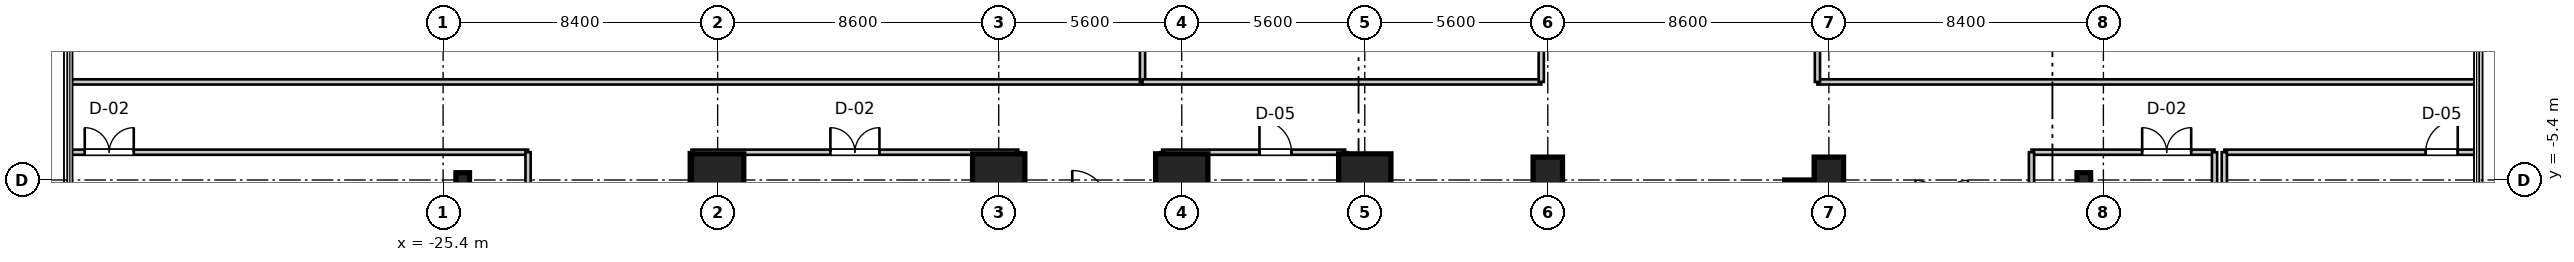
"""IFC4 building model, lengths in metres.
Left out: names, types, materials, properties, quantities, classifications, styles, units other than length and angle.
Written with IfcOpenShell. Run it as: python <this file> out.ifc"""

import sys

from ifc_helpers import new_model, si_unit, direction, frame, frame_2d, origin, origin_2d, place, context, subcontext, project, spatial, rectangle, i_section, extrude, source, transform, mapped, element, fill, save


model = new_model("IFC4")
c1 = context("Model", 3, precision=1e-05, world=origin(), true_north=direction((0.0, 1.0)))
c2 = subcontext(c1, "Body", "Model", "MODEL_VIEW")
j1 = project(units=[si_unit("LENGTHUNIT", "METRE"), si_unit("PLANEANGLEUNIT", "RADIAN")], contexts=[c1])
p1 = place(None, origin())
s1 = spatial("IfcSite", under=j1, at=p1, CompositionType="ELEMENT")
p2 = place(p1, origin())
s2 = spatial("IfcBuilding", under=s1, at=p2, CompositionType="ELEMENT")
p3 = place(p2, frame((0.0, 0.0, 10.8)))
s3 = spatial("IfcBuildingStorey", under=s2, at=p3, CompositionType="ELEMENT", Elevation=10.8)
m1 = source(origin(), c2, "Body", "SweptSolid", [
    extrude(rectangle(XDim=1.6, YDim=1.6, at=origin_2d()), origin(), (0.0, 0.0, 1.0), 5.355),
])
for number, where, z_axis, x_axis in (
    (1, (-17.0, -5.4, 0.0), (0.0, 0.0, 1.0), (1.0, 0.0, 0.0)),
    (2, (-8.4, -5.4, 0.0), (0.0, 0.0, 1.0), (1.0, 0.0, 0.0)),
    (3, (-2.8, -5.4, 0.0), (0.0, 0.0, 1.0), (1.0, 0.0, 0.0)),
    (4, (2.8, -5.4, 0.0), (0.0, 0.0, 1.0), (1.0, 0.0, 0.0)),
):
    element("IfcColumn", number, at=place(p3, frame(where, z_axis=z_axis, x_axis=x_axis)), inside=s3, PredefinedType="COLUMN", context=c2, shape_type="MappedRepresentation", body=[
        mapped(m1, transform((0.0, 0.0, 0.0), scale=1.0)),
    ])
m2 = source(origin(), c2, "Body", "SweptSolid", [
    extrude(rectangle(XDim=0.9, YDim=1.4, at=origin_2d()), origin(), (0.0, 0.0, 1.0), 5.355),
])
for number, where, z_axis, x_axis in (
    (5, (8.4, -5.4, 0.0), (0.0, 0.0, 1.0), (1.0, 0.0, 0.0)),
    (6, (17.0, -5.4, 0.0), (0.0, 0.0, 1.0), (1.0, 0.0, 0.0)),
):
    element("IfcColumn", number, at=place(p3, frame(where, z_axis=z_axis, x_axis=x_axis)), inside=s3, PredefinedType="PILASTER", context=c2, shape_type="MappedRepresentation", body=[
        mapped(m2, transform((0.0, 0.0, 0.0), scale=1.0)),
    ])
m3 = source(origin(), c2, "Body", "SweptSolid", [
    extrude(i_section(OverallWidth=0.416, OverallDepth=0.446, WebThickness=0.025, FlangeThickness=0.04, at=origin_2d()), origin(), (0.0, 0.0, 1.0), 5.355),
])
for number, where, z_axis, x_axis in (
    (7, (-24.8, -5.4, 0.0), (0.0, 0.0, 1.0), (1.0, 0.0, 0.0)),
    (8, (24.8, -5.4, 0.0), (0.0, 0.0, 1.0), (1.0, 0.0, 0.0)),
):
    element("IfcColumn", number, at=place(p3, frame(where, z_axis=z_axis, x_axis=x_axis)), inside=s3, PredefinedType="COLUMN", context=c2, shape_type="MappedRepresentation", body=[
        mapped(m3, transform((0.0, 0.0, 0.0), scale=1.0)),
    ])
m4 = source(origin(), c2, "Body", "SweptSolid", [
    extrude(rectangle(XDim=11.6, YDim=0.8, at=frame_2d((5.8, 0.0))), origin(), (0.0, 0.0, 1.0), 5.06),
])
p4 = place(p3, frame((16.05, -17.0, 0.0), z_axis=(0.0, 0.0, 1.0), x_axis=(0.0, 1.0, 0.0)))
e9 = element("IfcWall", 9, at=p4, inside=s3, PredefinedType="SHEAR", context=c2, shape_type="MappedRepresentation", body=[
    mapped(m4, transform((0.0, 0.0, 0.0), scale=1.0)),
])
m5 = source(origin(), c2, "Body", "SweptSolid", [
    extrude(rectangle(XDim=13.96, YDim=0.16, at=frame_2d((6.98, 0.0))), origin(), (0.0, 0.0, 1.0), 3.4),
])
p5 = place(p3, frame((-36.76, -4.55, 0.0), z_axis=(0.0, 0.0, 1.0), x_axis=(1.0, 0.0, 0.0)))
e10 = element("IfcWall", 10, at=p5, inside=s3, PredefinedType="PARTITIONING", context=c2, shape_type="MappedRepresentation", body=[
    mapped(m5, transform((0.0, 0.0, 0.0), scale=1.0)),
])
p6 = place(p5, frame((0.395, 0.0, 0.0)))
e11 = element("IfcOpeningElement", 11, at=p6, cuts=e10, PredefinedType="OPENING", context=c2, shape_type="SweptSolid", body=[
    extrude(rectangle(XDim=1.5, YDim=2.15, at=frame_2d((0.75, 1.075))), frame((0.0, 0.09, 0.0), z_axis=(0.0, -1.0, 0.0), x_axis=(1.0, 0.0, 0.0)), (0.0, 0.0, 1.0), 0.18),
])
m6 = source(origin(), c2, "Body", "SweptSolid", [
    extrude(rectangle(XDim=19.21, YDim=0.16, at=frame_2d((9.605, 0.0))), origin(), (0.0, 0.0, 1.0), 3.4),
])
p7 = place(p3, frame((-22.8, -23.76, 0.0), z_axis=(0.0, 0.0, 1.0), x_axis=(0.0, 1.0, 0.0)))
e12 = element("IfcWall", 12, at=p7, inside=s3, PredefinedType="PARTITIONING", context=c2, shape_type="MappedRepresentation", body=[
    mapped(m6, transform((0.0, 0.0, 0.0), scale=1.0)),
])
m7 = source(origin(), c2, "Body", "SweptSolid", [
    extrude(rectangle(XDim=10.0, YDim=0.16, at=frame_2d((5.0, 0.0))), origin(), (0.0, 0.0, 1.0), 3.4),
])
p8 = place(p3, frame((-17.8, -4.55, 0.0), z_axis=(0.0, 0.0, 1.0), x_axis=(1.0, 0.0, 0.0)))
e13 = element("IfcWall", 13, at=p8, inside=s3, PredefinedType="PARTITIONING", context=c2, shape_type="MappedRepresentation", body=[
    mapped(m7, transform((0.0, 0.0, 0.0), scale=1.0)),
])
p9 = place(p8, frame((4.25, 0.0, 0.0)))
e14 = element("IfcOpeningElement", 14, at=p9, cuts=e13, PredefinedType="OPENING", context=c2, shape_type="SweptSolid", body=[
    extrude(rectangle(XDim=1.5, YDim=2.15, at=frame_2d((0.75, 1.075))), frame((0.0, 0.09, 0.0), z_axis=(0.0, -1.0, 0.0), x_axis=(1.0, 0.0, 0.0)), (0.0, 0.0, 1.0), 0.18),
])
for number, where, z_axis, x_axis in (
    (15, (-17.8, -23.76, 0.0), (0.0, 0.0, 1.0), (0.0, 1.0, 0.0)),
    (16, (-7.8, -23.76, 0.0), (0.0, 0.0, 1.0), (0.0, 1.0, 0.0)),
):
    element("IfcWall", number, at=place(p3, frame(where, z_axis=z_axis, x_axis=x_axis)), inside=s3, PredefinedType="PARTITIONING", context=c2, shape_type="MappedRepresentation", body=[
        mapped(m6, transform((0.0, 0.0, 0.0), scale=1.0)),
    ])
m8 = source(origin(), c2, "Body", "SweptSolid", [
    extrude(rectangle(XDim=32.76, YDim=0.16, at=frame_2d((16.38, 0.0))), origin(), (0.0, 0.0, 1.0), 3.4),
])
p10 = place(p3, frame((-36.76, -2.4, 0.0), z_axis=(0.0, 0.0, 1.0), x_axis=(1.0, 0.0, 0.0)))
e17 = element("IfcWall", 17, at=p10, inside=s3, PredefinedType="PARTITIONING", context=c2, shape_type="MappedRepresentation", body=[
    mapped(m8, transform((0.0, 0.0, 0.0), scale=1.0)),
])
m9 = source(origin(), c2, "Body", "SweptSolid", [
    extrude(rectangle(XDim=4.8, YDim=0.16, at=frame_2d((2.4, 0.0))), origin(), (0.0, 0.0, 1.0), 3.4),
])
p11 = place(p3, frame((-4.0, -2.4, 0.0), z_axis=(0.0, 0.0, 1.0), x_axis=(0.0, 1.0, 0.0)))
e18 = element("IfcWall", 18, at=p11, inside=s3, PredefinedType="PARTITIONING", context=c2, shape_type="MappedRepresentation", body=[
    mapped(m9, transform((0.0, 0.0, 0.0), scale=1.0)),
])
m10 = source(origin(), c2, "Body", "SweptSolid", [
    extrude(rectangle(XDim=12.2, YDim=0.16, at=frame_2d((6.1, 0.0))), origin(), (0.0, 0.0, 1.0), 3.4),
])
p12 = place(p3, frame((-4.0, -2.4, 0.0), z_axis=(0.0, 0.0, 1.0), x_axis=(1.0, 0.0, 0.0)))
e19 = element("IfcWall", 19, at=p12, inside=s3, PredefinedType="PARTITIONING", context=c2, shape_type="MappedRepresentation", body=[
    mapped(m10, transform((0.0, 0.0, 0.0), scale=1.0)),
])
p13 = place(p3, frame((8.2, -2.4, 0.0), z_axis=(0.0, 0.0, 1.0), x_axis=(0.0, 1.0, 0.0)))
e20 = element("IfcWall", 20, at=p13, inside=s3, PredefinedType="PARTITIONING", context=c2, shape_type="MappedRepresentation", body=[
    mapped(m9, transform((0.0, 0.0, 0.0), scale=1.0)),
])
m11 = source(origin(), c2, "Body", "SweptSolid", [
    extrude(rectangle(XDim=20.11, YDim=0.16, at=frame_2d((10.055, 0.0))), origin(), (0.0, 0.0, 1.0), 3.4),
])
p14 = place(p3, frame((16.65, -2.4, 0.0), z_axis=(0.0, 0.0, 1.0), x_axis=(1.0, 0.0, 0.0)))
e21 = element("IfcWall", 21, at=p14, inside=s3, PredefinedType="PARTITIONING", context=c2, shape_type="MappedRepresentation", body=[
    mapped(m11, transform((0.0, 0.0, 0.0), scale=1.0)),
])
p15 = place(p3, frame((16.65, -2.4, 0.0), z_axis=(0.0, 0.0, 1.0), x_axis=(0.0, 1.0, 0.0)))
e22 = element("IfcWall", 22, at=p15, inside=s3, PredefinedType="PARTITIONING", context=c2, shape_type="MappedRepresentation", body=[
    mapped(m9, transform((0.0, 0.0, 0.0), scale=1.0)),
])
m12 = source(origin(), c2, "Body", "SweptSolid", [
    extrude(rectangle(XDim=5.6, YDim=0.16, at=frame_2d((2.8, 0.0))), origin(), (0.0, 0.0, 1.0), 3.4),
])
p16 = place(p3, frame((23.2, -4.55, 0.0), z_axis=(0.0, 0.0, 1.0), x_axis=(1.0, 0.0, 0.0)))
e23 = element("IfcWall", 23, at=p16, inside=s3, PredefinedType="PARTITIONING", context=c2, shape_type="MappedRepresentation", body=[
    mapped(m12, transform((0.0, 0.0, 0.0), scale=1.0)),
])
p17 = place(p16, frame((3.386, 0.0, 0.0)))
e24 = element("IfcOpeningElement", 24, at=p17, cuts=e23, PredefinedType="OPENING", context=c2, shape_type="SweptSolid", body=[
    extrude(rectangle(XDim=1.5, YDim=2.15, at=frame_2d((0.75, 1.075))), frame((0.0, 0.09, 0.0), z_axis=(0.0, -1.0, 0.0), x_axis=(1.0, 0.0, 0.0)), (0.0, 0.0, 1.0), 0.18),
])
for number, where, z_axis, x_axis in (
    (25, (23.2, -23.76, 0.0), (0.0, 0.0, 1.0), (0.0, 1.0, 0.0)),
    (26, (28.8, -23.76, 0.0), (0.0, 0.0, 1.0), (0.0, 1.0, 0.0)),
):
    element("IfcWall", number, at=place(p3, frame(where, z_axis=z_axis, x_axis=x_axis)), inside=s3, PredefinedType="PARTITIONING", context=c2, shape_type="MappedRepresentation", body=[
        mapped(m6, transform((0.0, 0.0, 0.0), scale=1.0)),
    ])
m13 = source(origin(), c2, "Body", "SweptSolid", [
    extrude(rectangle(XDim=7.66, YDim=0.16, at=frame_2d((3.83, 0.0))), origin(), (0.0, 0.0, 1.0), 3.4),
])
p18 = place(p3, frame((29.1, -4.55, 0.0), z_axis=(0.0, 0.0, 1.0), x_axis=(1.0, 0.0, 0.0)))
e27 = element("IfcWall", 27, at=p18, inside=s3, PredefinedType="PARTITIONING", context=c2, shape_type="MappedRepresentation", body=[
    mapped(m13, transform((0.0, 0.0, 0.0), scale=1.0)),
])
p19 = place(p18, frame((6.162, 0.0, 0.0)))
e28 = element("IfcOpeningElement", 28, at=p19, cuts=e27, PredefinedType="OPENING", context=c2, shape_type="SweptSolid", body=[
    extrude(rectangle(XDim=0.98, YDim=2.1, at=frame_2d((0.49, 1.05))), frame((0.0, 0.09, 0.0), z_axis=(0.0, -1.0, 0.0), x_axis=(1.0, 0.0, 0.0)), (0.0, 0.0, 1.0), 0.18),
])
m14 = source(origin(), c2, "Body", "SweptSolid", [
    extrude(rectangle(XDim=7.45, YDim=0.16, at=frame_2d((3.725, 0.0))), origin(), (0.0, 0.0, 1.0), 3.4),
])
p20 = place(p3, frame((29.1, -12.0, 0.0), z_axis=(0.0, 0.0, 1.0), x_axis=(0.0, 1.0, 0.0)))
e29 = element("IfcWall", 29, at=p20, inside=s3, PredefinedType="PARTITIONING", context=c2, shape_type="MappedRepresentation", body=[
    mapped(m14, transform((0.0, 0.0, 0.0), scale=1.0)),
])
m15 = source(origin(), c2, "Body", "SweptSolid", [
    extrude(rectangle(XDim=5.6, YDim=0.16, at=frame_2d((2.8, 0.0))), origin(), (0.0, 0.0, 1.0), 3.4),
])
p21 = place(p3, frame((-3.4, -4.55, 0.0), z_axis=(0.0, 0.0, 1.0), x_axis=(1.0, 0.0, 0.0)))
e30 = element("IfcWall", 30, at=p21, inside=s3, PredefinedType="PARTITIONING", context=c2, shape_type="MappedRepresentation", body=[
    mapped(m15, transform((0.0, 0.0, 0.0), scale=1.0)),
])
p22 = place(p21, frame((2.978, 0.0, 0.0)))
e31 = element("IfcOpeningElement", 31, at=p22, cuts=e30, PredefinedType="OPENING", context=c2, shape_type="SweptSolid", body=[
    extrude(rectangle(XDim=0.98, YDim=2.1, at=frame_2d((0.49, 1.05))), frame((0.0, 0.09, 0.0), z_axis=(0.0, -1.0, 0.0), x_axis=(1.0, 0.0, 0.0)), (0.0, 0.0, 1.0), 0.18),
])
m16 = source(origin(), c2, "Body", "SweptSolid", [
    extrude(rectangle(XDim=5.25, YDim=0.16, at=frame_2d((2.625, 0.0))), origin(), (0.0, 0.0, 1.0), 3.4),
])
for number, where, z_axis, x_axis in (
    (32, (-3.4, -9.8, 0.0), (0.0, 0.0, 1.0), (0.0, 1.0, 0.0)),
    (33, (2.2, -9.8, 0.0), (0.0, 0.0, 1.0), (0.0, 1.0, 0.0)),
):
    element("IfcWall", number, at=place(p3, frame(where, z_axis=z_axis, x_axis=x_axis)), inside=s3, PredefinedType="PARTITIONING", context=c2, shape_type="MappedRepresentation", body=[
        mapped(m16, transform((0.0, 0.0, 0.0), scale=1.0)),
    ])
m17 = source(origin(), c2, "Body", "SweptSolid", [
    extrude(rectangle(XDim=1.5, YDim=2.15, at=frame_2d((0.75, 1.075))), frame((0.0, 0.025, 0.0), z_axis=(0.0, -1.0, 0.0), x_axis=(1.0, 0.0, 0.0)), (0.0, 0.0, 1.0), 0.05),
])
p23 = place(p6, frame((1.5, 0.0, 0.0), z_axis=(0.0, 0.0, 1.0), x_axis=(-1.0, 0.0, 0.0)))
e34 = element("IfcDoor", 34, at=p23, inside=s3, OperationType="DOUBLE_DOOR_SINGLE_SWING", PredefinedType="DOOR", context=c2, shape_type="MappedRepresentation", body=[
    mapped(m17, transform((0.0, 0.0, 0.0), scale=1.0)),
])
fill(e11, e34)
p24 = place(p9, frame((1.5, 0.0, 0.0), z_axis=(0.0, 0.0, 1.0), x_axis=(-1.0, 0.0, 0.0)))
e35 = element("IfcDoor", 35, at=p24, inside=s3, OperationType="DOUBLE_DOOR_SINGLE_SWING", PredefinedType="DOOR", context=c2, shape_type="MappedRepresentation", body=[
    mapped(m17, transform((0.0, 0.0, 0.0), scale=1.0)),
])
fill(e14, e35)
p25 = place(p17, frame((1.5, 0.0, 0.0), z_axis=(0.0, 0.0, 1.0), x_axis=(-1.0, 0.0, 0.0)))
e36 = element("IfcDoor", 36, at=p25, inside=s3, OperationType="DOUBLE_DOOR_SINGLE_SWING", PredefinedType="DOOR", context=c2, shape_type="MappedRepresentation", body=[
    mapped(m17, transform((0.0, 0.0, 0.0), scale=1.0)),
])
fill(e24, e36)
m18 = source(origin(), c2, "Body", "SweptSolid", [
    extrude(rectangle(XDim=0.98, YDim=2.1, at=frame_2d((0.49, 1.05))), frame((0.0, 0.025, 0.0), z_axis=(0.0, -1.0, 0.0), x_axis=(1.0, 0.0, 0.0)), (0.0, 0.0, 1.0), 0.05),
])
p26 = place(p19, frame((0.98, 0.0, 0.0), z_axis=(0.0, 0.0, 1.0), x_axis=(-1.0, 0.0, 0.0)))
e37 = element("IfcDoor", 37, at=p26, inside=s3, OperationType="SINGLE_SWING_RIGHT", PredefinedType="DOOR", context=c2, shape_type="MappedRepresentation", body=[
    mapped(m18, transform((0.0, 0.0, 0.0), scale=1.0)),
])
fill(e28, e37)
p27 = place(p22, frame((0.98, 0.0, 0.0), z_axis=(0.0, 0.0, 1.0), x_axis=(-1.0, 0.0, 0.0)))
e38 = element("IfcDoor", 38, at=p27, inside=s3, OperationType="SINGLE_SWING_LEFT", PredefinedType="DOOR", context=c2, shape_type="MappedRepresentation", body=[
    mapped(m18, transform((0.0, 0.0, 0.0), scale=1.0)),
])
fill(e31, e38)
save(model, sys.argv[1])
